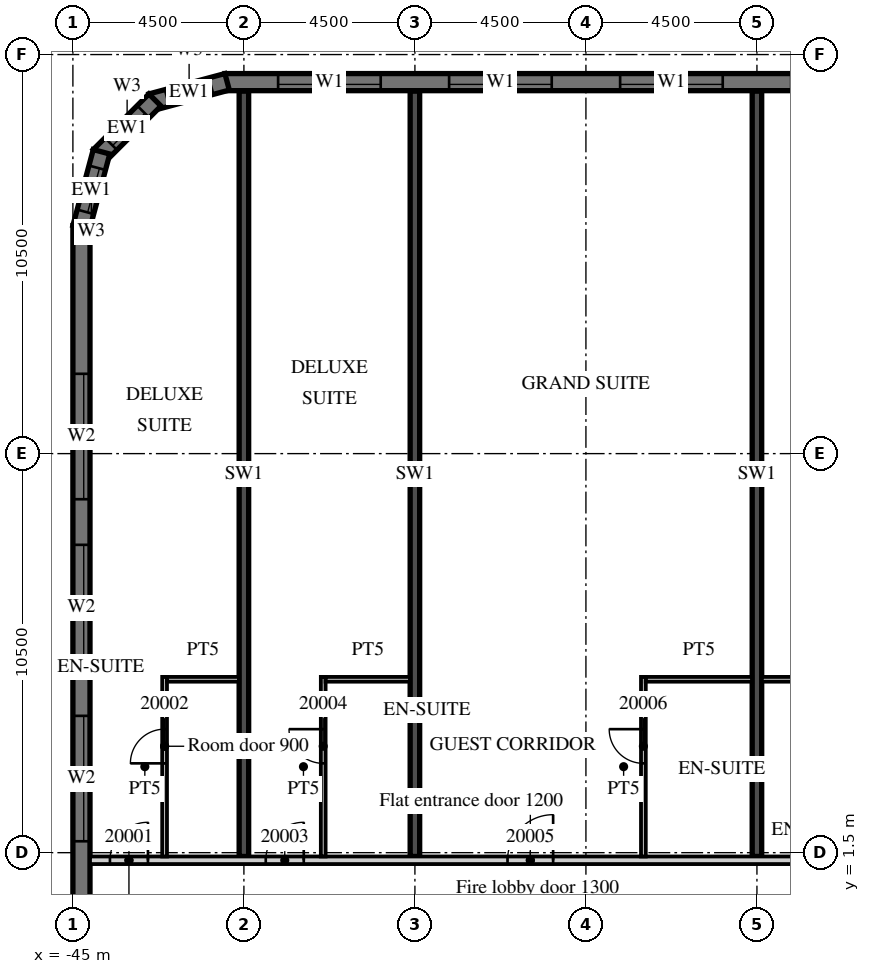
"""IFC4 building model, lengths in metres.
Left out: names, types, materials, properties, quantities, classifications, styles, units other than length and angle.
Written with IfcOpenShell. Run it as: python <this file> out.ifc"""

import sys

from ifc_helpers import new_model, si_unit, direction, frame, frame_2d, origin, place, context, subcontext, project, spatial, polyline, rectangle, outline, extrude, element, fill, save


model = new_model("IFC4")
c1 = context("Model", 3, precision=1e-05, world=origin(), true_north=direction((0.0, 1.0)))
c2 = subcontext(c1, "Body", "Model", "MODEL_VIEW")
j1 = project(units=[si_unit("LENGTHUNIT", "METRE"), si_unit("PLANEANGLEUNIT", "RADIAN")], contexts=[c1])
p1 = place(None, origin())
s1 = spatial("IfcSite", under=j1, at=p1, CompositionType="ELEMENT")
p2 = place(p1, origin())
s2 = spatial("IfcBuilding", under=s1, at=p2, CompositionType="ELEMENT")
p3 = place(p2, frame((0.0, 0.0, 96.3)))
s3 = spatial("IfcBuildingStorey", under=s2, at=p3, CompositionType="ELEMENT", Elevation=96.3)
for number, where, z_axis, x_axis in (
    (1, (-40.5, 1.4, 0.0), (0.0, 0.0, 1.0), (0.0, 1.0, 0.0)),
    (2, (-36.0, 1.4, 0.0), (0.0, 0.0, 1.0), (0.0, 1.0, 0.0)),
    (3, (-27.0, 1.4, 0.0), (0.0, 0.0, 1.0), (0.0, 1.0, 0.0)),
):
    element("IfcWall", number, at=place(p3, frame(where, z_axis=z_axis, x_axis=x_axis)), inside=s3, PredefinedType="SHEAR", context=c2, shape_type="SweptSolid", body=[
        extrude(rectangle(XDim=20.14, YDim=0.25, at=frame_2d((10.07, 0.0))), origin(), (0.0, 0.0, 1.0), 3.0),
    ])
p4 = place(p3, frame((13.5, 21.775, 0.0), z_axis=(0.0, 0.0, 1.0), x_axis=(-1.0, 0.0, 0.0)))
e4 = element("IfcWall", 4, at=p4, inside=s3, PredefinedType="SOLIDWALL", context=c2, shape_type="SweptSolid", body=[
    extrude(rectangle(XDim=54.5, YDim=0.45, at=frame_2d((27.25, 0.0))), origin(), (0.0, 0.0, 1.0), 3.0),
])
p5 = place(p4, frame((0.9, 0.0, 0.45)))
e5 = element("IfcOpeningElement", 5, at=p5, cuts=e4, PredefinedType="OPENING", context=c2, shape_type="SweptSolid", body=[
    extrude(rectangle(XDim=2.7, YDim=2.25, at=frame_2d((1.35, 1.125))), frame((0.0, 0.235, 0.0), z_axis=(0.0, -1.0, 0.0), x_axis=(1.0, 0.0, 0.0)), (0.0, 0.0, 1.0), 0.47),
])
p6 = place(p4, frame((5.4, 0.0, 0.45)))
e6 = element("IfcOpeningElement", 6, at=p6, cuts=e4, PredefinedType="OPENING", context=c2, shape_type="SweptSolid", body=[
    extrude(rectangle(XDim=2.7, YDim=2.25, at=frame_2d((1.35, 1.125))), frame((0.0, 0.235, 0.0), z_axis=(0.0, -1.0, 0.0), x_axis=(1.0, 0.0, 0.0)), (0.0, 0.0, 1.0), 0.47),
])
p7 = place(p4, frame((9.9, 0.0, 0.45)))
e7 = element("IfcOpeningElement", 7, at=p7, cuts=e4, PredefinedType="OPENING", context=c2, shape_type="SweptSolid", body=[
    extrude(rectangle(XDim=2.7, YDim=2.25, at=frame_2d((1.35, 1.125))), frame((0.0, 0.235, 0.0), z_axis=(0.0, -1.0, 0.0), x_axis=(1.0, 0.0, 0.0)), (0.0, 0.0, 1.0), 0.47),
])
p8 = place(p4, frame((14.4, 0.0, 0.45)))
e8 = element("IfcOpeningElement", 8, at=p8, cuts=e4, PredefinedType="OPENING", context=c2, shape_type="SweptSolid", body=[
    extrude(rectangle(XDim=2.7, YDim=2.25, at=frame_2d((1.35, 1.125))), frame((0.0, 0.235, 0.0), z_axis=(0.0, -1.0, 0.0), x_axis=(1.0, 0.0, 0.0)), (0.0, 0.0, 1.0), 0.47),
])
p9 = place(p4, frame((18.9, 0.0, 0.45)))
e9 = element("IfcOpeningElement", 9, at=p9, cuts=e4, PredefinedType="OPENING", context=c2, shape_type="SweptSolid", body=[
    extrude(rectangle(XDim=2.7, YDim=2.25, at=frame_2d((1.35, 1.125))), frame((0.0, 0.235, 0.0), z_axis=(0.0, -1.0, 0.0), x_axis=(1.0, 0.0, 0.0)), (0.0, 0.0, 1.0), 0.47),
])
p10 = place(p4, frame((23.4, 0.0, 0.45)))
e10 = element("IfcOpeningElement", 10, at=p10, cuts=e4, PredefinedType="OPENING", context=c2, shape_type="SweptSolid", body=[
    extrude(rectangle(XDim=2.7, YDim=2.25, at=frame_2d((1.35, 1.125))), frame((0.0, 0.235, 0.0), z_axis=(0.0, -1.0, 0.0), x_axis=(1.0, 0.0, 0.0)), (0.0, 0.0, 1.0), 0.47),
])
p11 = place(p4, frame((27.9, 0.0, 0.45)))
e11 = element("IfcOpeningElement", 11, at=p11, cuts=e4, PredefinedType="OPENING", context=c2, shape_type="SweptSolid", body=[
    extrude(rectangle(XDim=2.7, YDim=2.25, at=frame_2d((1.35, 1.125))), frame((0.0, 0.235, 0.0), z_axis=(0.0, -1.0, 0.0), x_axis=(1.0, 0.0, 0.0)), (0.0, 0.0, 1.0), 0.47),
])
p12 = place(p4, frame((32.4, 0.0, 0.45)))
e12 = element("IfcOpeningElement", 12, at=p12, cuts=e4, PredefinedType="OPENING", context=c2, shape_type="SweptSolid", body=[
    extrude(rectangle(XDim=2.7, YDim=2.25, at=frame_2d((1.35, 1.125))), frame((0.0, 0.235, 0.0), z_axis=(0.0, -1.0, 0.0), x_axis=(1.0, 0.0, 0.0)), (0.0, 0.0, 1.0), 0.47),
])
p13 = place(p4, frame((36.9, 0.0, 0.45)))
e13 = element("IfcOpeningElement", 13, at=p13, cuts=e4, PredefinedType="OPENING", context=c2, shape_type="SweptSolid", body=[
    extrude(rectangle(XDim=2.7, YDim=2.25, at=frame_2d((1.35, 1.125))), frame((0.0, 0.235, 0.0), z_axis=(0.0, -1.0, 0.0), x_axis=(1.0, 0.0, 0.0)), (0.0, 0.0, 1.0), 0.47),
])
p14 = place(p4, frame((41.4, 0.0, 0.45)))
e14 = element("IfcOpeningElement", 14, at=p14, cuts=e4, PredefinedType="OPENING", context=c2, shape_type="SweptSolid", body=[
    extrude(rectangle(XDim=2.7, YDim=2.25, at=frame_2d((1.35, 1.125))), frame((0.0, 0.235, 0.0), z_axis=(0.0, -1.0, 0.0), x_axis=(1.0, 0.0, 0.0)), (0.0, 0.0, 1.0), 0.47),
])
p15 = place(p4, frame((45.9, 0.0, 0.45)))
e15 = element("IfcOpeningElement", 15, at=p15, cuts=e4, PredefinedType="OPENING", context=c2, shape_type="SweptSolid", body=[
    extrude(rectangle(XDim=2.7, YDim=2.25, at=frame_2d((1.35, 1.125))), frame((0.0, 0.235, 0.0), z_axis=(0.0, -1.0, 0.0), x_axis=(1.0, 0.0, 0.0)), (0.0, 0.0, 1.0), 0.47),
])
p16 = place(p4, frame((50.4, 0.0, 0.45)))
e16 = element("IfcOpeningElement", 16, at=p16, cuts=e4, PredefinedType="OPENING", context=c2, shape_type="SweptSolid", body=[
    extrude(rectangle(XDim=2.7, YDim=2.25, at=frame_2d((1.35, 1.125))), frame((0.0, 0.235, 0.0), z_axis=(0.0, -1.0, 0.0), x_axis=(1.0, 0.0, 0.0)), (0.0, 0.0, 1.0), 0.47),
])
p17 = place(p3, frame((-40.942, 21.783, 0.0), z_axis=(0.0, 0.0, 1.0), x_axis=(-0.965926999034, -0.25881466832, 0.0)))
e17 = element("IfcWall", 17, at=p17, inside=s3, PredefinedType="SOLIDWALL", context=c2, shape_type="SweptSolid", body=[
    extrude(outline(polyline([(0.0, -0.225), (2.071, -0.225), (1.95, 0.225), (0.121, 0.225), (0.0, -0.225)])), origin(), (0.0, 0.0, 1.0), 3.0),
])
p18 = place(p17, frame((0.435, 0.0, 0.45)))
e18 = element("IfcOpeningElement", 18, at=p18, cuts=e17, PredefinedType="OPENING", context=c2, shape_type="SweptSolid", body=[
    extrude(rectangle(XDim=1.2, YDim=2.25, at=frame_2d((0.6, 1.125))), frame((0.0, 0.235, 0.0), z_axis=(0.0, -1.0, 0.0), x_axis=(1.0, 0.0, 0.0)), (0.0, 0.0, 1.0), 0.47),
])
p19 = place(p3, frame((-42.841, 21.305, 0.0), z_axis=(0.0, 0.0, 1.0), x_axis=(-0.707106781187, -0.707106781187, 0.0)))
e19 = element("IfcWall", 19, at=p19, inside=s3, PredefinedType="SOLIDWALL", context=c2, shape_type="SweptSolid", body=[
    extrude(outline(polyline([(0.0, -0.225), (2.071, -0.225), (1.95, 0.225), (0.121, 0.225), (0.0, -0.225)])), origin(), (0.0, 0.0, 1.0), 3.0),
])
p20 = place(p19, frame((0.435, 0.0, 0.45)))
e20 = element("IfcOpeningElement", 20, at=p20, cuts=e19, PredefinedType="OPENING", context=c2, shape_type="SweptSolid", body=[
    extrude(rectangle(XDim=1.2, YDim=2.25, at=frame_2d((0.6, 1.125))), frame((0.0, 0.235, 0.0), z_axis=(0.0, -1.0, 0.0), x_axis=(1.0, 0.0, 0.0)), (0.0, 0.0, 1.0), 0.47),
])
p21 = place(p3, frame((-44.247, 19.942, 0.0), z_axis=(0.0, 0.0, 1.0), x_axis=(-0.25881466832, -0.965926999034, 0.0)))
e21 = element("IfcWall", 21, at=p21, inside=s3, PredefinedType="SOLIDWALL", context=c2, shape_type="SweptSolid", body=[
    extrude(outline(polyline([(-0.0, -0.225), (2.07, -0.225), (1.95, 0.225), (0.12, 0.225), (-0.0, -0.225)])), origin(), (0.0, 0.0, 1.0), 3.0),
])
p22 = place(p21, frame((0.435, 0.0, 0.45)))
e22 = element("IfcOpeningElement", 22, at=p22, cuts=e21, PredefinedType="OPENING", context=c2, shape_type="SweptSolid", body=[
    extrude(rectangle(XDim=1.2, YDim=2.25, at=frame_2d((0.6, 1.125))), frame((0.0, 0.235, 0.0), z_axis=(0.0, -1.0, 0.0), x_axis=(1.0, 0.0, 0.0)), (0.0, 0.0, 1.0), 0.47),
])
p23 = place(p3, frame((-44.775, 18.0, 0.0), z_axis=(0.0, 0.0, 1.0), x_axis=(0.0, -1.0, 0.0)))
e23 = element("IfcWall", 23, at=p23, inside=s3, PredefinedType="SOLIDWALL", context=c2, shape_type="SweptSolid", body=[
    extrude(rectangle(XDim=36.0, YDim=0.45, at=frame_2d((18.0, 0.0))), origin(), (0.0, 0.0, 1.0), 3.0),
])
p24 = place(p23, frame((3.9, 0.0, 0.45)))
e24 = element("IfcOpeningElement", 24, at=p24, cuts=e23, PredefinedType="OPENING", context=c2, shape_type="SweptSolid", body=[
    extrude(rectangle(XDim=3.3, YDim=2.25, at=frame_2d((1.65, 1.125))), frame((0.0, 0.235, 0.0), z_axis=(0.0, -1.0, 0.0), x_axis=(1.0, 0.0, 0.0)), (0.0, 0.0, 1.0), 0.47),
])
p25 = place(p23, frame((8.4, 0.0, 0.45)))
e25 = element("IfcOpeningElement", 25, at=p25, cuts=e23, PredefinedType="OPENING", context=c2, shape_type="SweptSolid", body=[
    extrude(rectangle(XDim=3.3, YDim=2.25, at=frame_2d((1.65, 1.125))), frame((0.0, 0.235, 0.0), z_axis=(0.0, -1.0, 0.0), x_axis=(1.0, 0.0, 0.0)), (0.0, 0.0, 1.0), 0.47),
])
p26 = place(p23, frame((12.9, 0.0, 0.45)))
e26 = element("IfcOpeningElement", 26, at=p26, cuts=e23, PredefinedType="OPENING", context=c2, shape_type="SweptSolid", body=[
    extrude(rectangle(XDim=3.3, YDim=2.25, at=frame_2d((1.65, 1.125))), frame((0.0, 0.235, 0.0), z_axis=(0.0, -1.0, 0.0), x_axis=(1.0, 0.0, 0.0)), (0.0, 0.0, 1.0), 0.47),
])
p27 = place(p3, frame((-44.55, 1.3, 0.0), z_axis=(0.0, 0.0, 1.0), x_axis=(1.0, 0.0, 0.0)))
e27 = element("IfcWall", 27, at=p27, inside=s3, PredefinedType="PARTITIONING", context=c2, shape_type="SweptSolid", body=[
    extrude(rectangle(XDim=58.05, YDim=0.2, at=frame_2d((29.025, 0.0))), origin(), (0.0, 0.0, 1.0), 3.0),
])
p28 = place(p27, frame((0.525, 0.0, 0.0)))
e28 = element("IfcOpeningElement", 28, at=p28, cuts=e27, PredefinedType="OPENING", context=c2, shape_type="SweptSolid", body=[
    extrude(rectangle(XDim=1.0, YDim=2.1, at=frame_2d((0.5, 1.05))), frame((0.0, 0.11, 0.0), z_axis=(0.0, -1.0, 0.0), x_axis=(1.0, 0.0, 0.0)), (0.0, 0.0, 1.0), 0.22),
])
p29 = place(p27, frame((4.625, 0.0, 0.0)))
e29 = element("IfcOpeningElement", 29, at=p29, cuts=e27, PredefinedType="OPENING", context=c2, shape_type="SweptSolid", body=[
    extrude(rectangle(XDim=1.0, YDim=2.1, at=frame_2d((0.5, 1.05))), frame((0.0, 0.11, 0.0), z_axis=(0.0, -1.0, 0.0), x_axis=(1.0, 0.0, 0.0)), (0.0, 0.0, 1.0), 0.22),
])
p30 = place(p27, frame((10.987, 0.0, 0.0)))
e30 = element("IfcOpeningElement", 30, at=p30, cuts=e27, PredefinedType="OPENING", context=c2, shape_type="SweptSolid", body=[
    extrude(rectangle(XDim=1.2, YDim=2.1, at=frame_2d((0.6, 1.05))), frame((0.0, 0.11, 0.0), z_axis=(0.0, -1.0, 0.0), x_axis=(1.0, 0.0, 0.0)), (0.0, 0.0, 1.0), 0.22),
])
p31 = place(p27, frame((22.912, 0.0, 0.0)))
e31 = element("IfcOpeningElement", 31, at=p31, cuts=e27, PredefinedType="OPENING", context=c2, shape_type="SweptSolid", body=[
    extrude(rectangle(XDim=1.2, YDim=2.1, at=frame_2d((0.6, 1.05))), frame((0.0, 0.11, 0.0), z_axis=(0.0, -1.0, 0.0), x_axis=(1.0, 0.0, 0.0)), (0.0, 0.0, 1.0), 0.22),
])
p32 = place(p27, frame((28.987, 0.0, 0.0)))
e32 = element("IfcOpeningElement", 32, at=p32, cuts=e27, PredefinedType="OPENING", context=c2, shape_type="SweptSolid", body=[
    extrude(rectangle(XDim=1.2, YDim=2.1, at=frame_2d((0.6, 1.05))), frame((0.0, 0.11, 0.0), z_axis=(0.0, -1.0, 0.0), x_axis=(1.0, 0.0, 0.0)), (0.0, 0.0, 1.0), 0.22),
])
p33 = place(p27, frame((36.125, 0.0, 0.0)))
e33 = element("IfcOpeningElement", 33, at=p33, cuts=e27, PredefinedType="OPENING", context=c2, shape_type="SweptSolid", body=[
    extrude(rectangle(XDim=1.0, YDim=2.1, at=frame_2d((0.5, 1.05))), frame((0.0, 0.11, 0.0), z_axis=(0.0, -1.0, 0.0), x_axis=(1.0, 0.0, 0.0)), (0.0, 0.0, 1.0), 0.22),
])
p34 = place(p27, frame((42.975, 0.0, 0.0)))
e34 = element("IfcOpeningElement", 34, at=p34, cuts=e27, PredefinedType="OPENING", context=c2, shape_type="SweptSolid", body=[
    extrude(rectangle(XDim=1.0, YDim=2.1, at=frame_2d((0.5, 1.05))), frame((0.0, 0.11, 0.0), z_axis=(0.0, -1.0, 0.0), x_axis=(1.0, 0.0, 0.0)), (0.0, 0.0, 1.0), 0.22),
])
p35 = place(p27, frame((47.5, 0.0, 0.0)))
e35 = element("IfcOpeningElement", 35, at=p35, cuts=e27, PredefinedType="OPENING", context=c2, shape_type="SweptSolid", body=[
    extrude(rectangle(XDim=1.0, YDim=2.1, at=frame_2d((0.5, 1.05))), frame((0.0, 0.11, 0.0), z_axis=(0.0, -1.0, 0.0), x_axis=(1.0, 0.0, 0.0)), (0.0, 0.0, 1.0), 0.22),
])
p36 = place(p27, frame((49.6, 0.0, 0.0)))
e36 = element("IfcOpeningElement", 36, at=p36, cuts=e27, PredefinedType="OPENING", context=c2, shape_type="SweptSolid", body=[
    extrude(rectangle(XDim=1.0, YDim=2.1, at=frame_2d((0.5, 1.05))), frame((0.0, 0.11, 0.0), z_axis=(0.0, -1.0, 0.0), x_axis=(1.0, 0.0, 0.0)), (0.0, 0.0, 1.0), 0.22),
])
p37 = place(p27, frame((56.475, 0.0, 0.0)))
e37 = element("IfcOpeningElement", 37, at=p37, cuts=e27, PredefinedType="OPENING", context=c2, shape_type="SweptSolid", body=[
    extrude(rectangle(XDim=1.0, YDim=2.1, at=frame_2d((0.5, 1.05))), frame((0.0, 0.11, 0.0), z_axis=(0.0, -1.0, 0.0), x_axis=(1.0, 0.0, 0.0)), (0.0, 0.0, 1.0), 0.22),
])
p38 = place(p3, frame((-42.587, 1.4, 0.0), z_axis=(0.0, 0.0, 1.0), x_axis=(0.0, 1.0, 0.0)))
e38 = element("IfcWall", 38, at=p38, inside=s3, PredefinedType="PARTITIONING", context=c2, shape_type="SweptSolid", body=[
    extrude(rectangle(XDim=4.725, YDim=0.125, at=frame_2d((2.363, 0.0))), origin(), (0.0, 0.0, 1.0), 3.0),
])
p39 = place(p38, frame((2.45, 0.0, 0.0)))
e39 = element("IfcOpeningElement", 39, at=p39, cuts=e38, PredefinedType="OPENING", context=c2, shape_type="SweptSolid", body=[
    extrude(rectangle(XDim=0.9, YDim=2.1, at=frame_2d((0.45, 1.05))), frame((0.0, 0.073, 0.0), z_axis=(0.0, -1.0, 0.0), x_axis=(1.0, 0.0, 0.0)), (0.0, 0.0, 1.0), 0.145),
])
p40 = place(p3, frame((-42.525, 6.062, 0.0), z_axis=(0.0, 0.0, 1.0), x_axis=(1.0, 0.0, 0.0)))
e40 = element("IfcWall", 40, at=p40, inside=s3, PredefinedType="PARTITIONING", context=c2, shape_type="SweptSolid", body=[
    extrude(rectangle(XDim=1.9, YDim=0.125, at=frame_2d((0.95, 0.0))), origin(), (0.0, 0.0, 1.0), 3.0),
])
p41 = place(p3, frame((-38.413, 1.4, 0.0), z_axis=(0.0, 0.0, 1.0), x_axis=(0.0, 1.0, 0.0)))
e41 = element("IfcWall", 41, at=p41, inside=s3, PredefinedType="PARTITIONING", context=c2, shape_type="SweptSolid", body=[
    extrude(rectangle(XDim=4.725, YDim=0.125, at=frame_2d((2.363, 0.0))), origin(), (0.0, 0.0, 1.0), 3.0),
])
p42 = place(p41, frame((2.45, 0.0, 0.0)))
e42 = element("IfcOpeningElement", 42, at=p42, cuts=e41, PredefinedType="OPENING", context=c2, shape_type="SweptSolid", body=[
    extrude(rectangle(XDim=0.9, YDim=2.1, at=frame_2d((0.45, 1.05))), frame((0.0, 0.073, 0.0), z_axis=(0.0, -1.0, 0.0), x_axis=(1.0, 0.0, 0.0)), (0.0, 0.0, 1.0), 0.145),
])
p43 = place(p3, frame((-38.35, 6.062, 0.0), z_axis=(0.0, 0.0, 1.0), x_axis=(1.0, 0.0, 0.0)))
e43 = element("IfcWall", 43, at=p43, inside=s3, PredefinedType="PARTITIONING", context=c2, shape_type="SweptSolid", body=[
    extrude(rectangle(XDim=2.225, YDim=0.125, at=frame_2d((1.113, 0.0))), origin(), (0.0, 0.0, 1.0), 3.0),
])
p44 = place(p3, frame((-29.988, 1.4, 0.0), z_axis=(0.0, 0.0, 1.0), x_axis=(0.0, 1.0, 0.0)))
e44 = element("IfcWall", 44, at=p44, inside=s3, PredefinedType="PARTITIONING", context=c2, shape_type="SweptSolid", body=[
    extrude(rectangle(XDim=4.725, YDim=0.125, at=frame_2d((2.363, 0.0))), origin(), (0.0, 0.0, 1.0), 3.0),
])
p45 = place(p44, frame((2.45, 0.0, 0.0)))
e45 = element("IfcOpeningElement", 45, at=p45, cuts=e44, PredefinedType="OPENING", context=c2, shape_type="SweptSolid", body=[
    extrude(rectangle(XDim=0.9, YDim=2.1, at=frame_2d((0.45, 1.05))), frame((0.0, 0.073, 0.0), z_axis=(0.0, -1.0, 0.0), x_axis=(1.0, 0.0, 0.0)), (0.0, 0.0, 1.0), 0.145),
])
for number, where, z_axis, x_axis in (
    (46, (-29.925, 6.062, 0.0), (0.0, 0.0, 1.0), (1.0, 0.0, 0.0)),
    (47, (-26.875, 6.062, 0.0), (0.0, 0.0, 1.0), (1.0, 0.0, 0.0)),
):
    element("IfcWall", number, at=place(p3, frame(where, z_axis=z_axis, x_axis=x_axis)), inside=s3, PredefinedType="PARTITIONING", context=c2, shape_type="SweptSolid", body=[
        extrude(rectangle(XDim=2.8, YDim=0.125, at=frame_2d((1.4, 0.0))), origin(), (0.0, 0.0, 1.0), 3.0),
    ])
p46 = place(p14, origin())
e48 = element("IfcWindow", 48, at=p46, inside=s3, PartitioningType="SINGLE_PANEL", PredefinedType="WINDOW", context=c2, shape_type="SweptSolid", body=[
    extrude(rectangle(XDim=2.7, YDim=2.25, at=frame_2d((1.35, 1.125))), frame((0.0, 0.09, 0.0), z_axis=(0.0, -1.0, 0.0), x_axis=(1.0, 0.0, 0.0)), (0.0, 0.0, 1.0), 0.06),
])
fill(e14, e48)
p47 = place(p15, origin())
e49 = element("IfcWindow", 49, at=p47, inside=s3, PartitioningType="SINGLE_PANEL", PredefinedType="WINDOW", context=c2, shape_type="SweptSolid", body=[
    extrude(rectangle(XDim=2.7, YDim=2.25, at=frame_2d((1.35, 1.125))), frame((0.0, 0.09, 0.0), z_axis=(0.0, -1.0, 0.0), x_axis=(1.0, 0.0, 0.0)), (0.0, 0.0, 1.0), 0.06),
])
fill(e15, e49)
p48 = place(p16, origin())
e50 = element("IfcWindow", 50, at=p48, inside=s3, PartitioningType="SINGLE_PANEL", PredefinedType="WINDOW", context=c2, shape_type="SweptSolid", body=[
    extrude(rectangle(XDim=2.7, YDim=2.25, at=frame_2d((1.35, 1.125))), frame((0.0, 0.09, 0.0), z_axis=(0.0, -1.0, 0.0), x_axis=(1.0, 0.0, 0.0)), (0.0, 0.0, 1.0), 0.06),
])
fill(e16, e50)
p49 = place(p18, origin())
e51 = element("IfcWindow", 51, at=p49, inside=s3, PartitioningType="SINGLE_PANEL", PredefinedType="WINDOW", context=c2, shape_type="SweptSolid", body=[
    extrude(rectangle(XDim=1.2, YDim=2.25, at=frame_2d((0.6, 1.125))), frame((0.0, 0.09, 0.0), z_axis=(0.0, -1.0, 0.0), x_axis=(1.0, 0.0, 0.0)), (0.0, 0.0, 1.0), 0.06),
])
fill(e18, e51)
p50 = place(p20, origin())
e52 = element("IfcWindow", 52, at=p50, inside=s3, PartitioningType="SINGLE_PANEL", PredefinedType="WINDOW", context=c2, shape_type="SweptSolid", body=[
    extrude(rectangle(XDim=1.2, YDim=2.25, at=frame_2d((0.6, 1.125))), frame((0.0, 0.09, 0.0), z_axis=(0.0, -1.0, 0.0), x_axis=(1.0, 0.0, 0.0)), (0.0, 0.0, 1.0), 0.06),
])
fill(e20, e52)
p51 = place(p22, origin())
e53 = element("IfcWindow", 53, at=p51, inside=s3, PartitioningType="SINGLE_PANEL", PredefinedType="WINDOW", context=c2, shape_type="SweptSolid", body=[
    extrude(rectangle(XDim=1.2, YDim=2.25, at=frame_2d((0.6, 1.125))), frame((0.0, 0.09, 0.0), z_axis=(0.0, -1.0, 0.0), x_axis=(1.0, 0.0, 0.0)), (0.0, 0.0, 1.0), 0.06),
])
fill(e22, e53)
p52 = place(p24, origin())
e54 = element("IfcWindow", 54, at=p52, inside=s3, PartitioningType="SINGLE_PANEL", PredefinedType="WINDOW", context=c2, shape_type="SweptSolid", body=[
    extrude(rectangle(XDim=3.3, YDim=2.25, at=frame_2d((1.65, 1.125))), frame((0.0, 0.09, 0.0), z_axis=(0.0, -1.0, 0.0), x_axis=(1.0, 0.0, 0.0)), (0.0, 0.0, 1.0), 0.06),
])
fill(e24, e54)
p53 = place(p25, origin())
e55 = element("IfcWindow", 55, at=p53, inside=s3, PartitioningType="SINGLE_PANEL", PredefinedType="WINDOW", context=c2, shape_type="SweptSolid", body=[
    extrude(rectangle(XDim=3.3, YDim=2.25, at=frame_2d((1.65, 1.125))), frame((0.0, 0.09, 0.0), z_axis=(0.0, -1.0, 0.0), x_axis=(1.0, 0.0, 0.0)), (0.0, 0.0, 1.0), 0.06),
])
fill(e25, e55)
p54 = place(p26, origin())
e56 = element("IfcWindow", 56, at=p54, inside=s3, PartitioningType="SINGLE_PANEL", PredefinedType="WINDOW", context=c2, shape_type="SweptSolid", body=[
    extrude(rectangle(XDim=3.3, YDim=2.25, at=frame_2d((1.65, 1.125))), frame((0.0, 0.09, 0.0), z_axis=(0.0, -1.0, 0.0), x_axis=(1.0, 0.0, 0.0)), (0.0, 0.0, 1.0), 0.06),
])
fill(e26, e56)
p55 = place(p28, origin())
e57 = element("IfcDoor", 57, at=p55, inside=s3, OperationType="SINGLE_SWING_RIGHT", PredefinedType="DOOR", context=c2, shape_type="SweptSolid", body=[
    extrude(rectangle(XDim=1.0, YDim=2.1, at=frame_2d((0.5, 1.05))), frame((0.0, 0.025, 0.0), z_axis=(0.0, -1.0, 0.0), x_axis=(1.0, 0.0, 0.0)), (0.0, 0.0, 1.0), 0.05),
])
fill(e28, e57)
p56 = place(p39, origin())
e58 = element("IfcDoor", 58, at=p56, inside=s3, OperationType="SINGLE_SWING_LEFT", PredefinedType="DOOR", context=c2, shape_type="SweptSolid", body=[
    extrude(rectangle(XDim=0.9, YDim=2.1, at=frame_2d((0.45, 1.05))), frame((0.0, 0.025, 0.0), z_axis=(0.0, -1.0, 0.0), x_axis=(1.0, 0.0, 0.0)), (0.0, 0.0, 1.0), 0.05),
])
fill(e39, e58)
p57 = place(p29, origin())
e59 = element("IfcDoor", 59, at=p57, inside=s3, OperationType="SINGLE_SWING_RIGHT", PredefinedType="DOOR", context=c2, shape_type="SweptSolid", body=[
    extrude(rectangle(XDim=1.0, YDim=2.1, at=frame_2d((0.5, 1.05))), frame((0.0, 0.025, 0.0), z_axis=(0.0, -1.0, 0.0), x_axis=(1.0, 0.0, 0.0)), (0.0, 0.0, 1.0), 0.05),
])
fill(e29, e59)
p58 = place(p42, origin())
e60 = element("IfcDoor", 60, at=p58, inside=s3, OperationType="SINGLE_SWING_RIGHT", PredefinedType="DOOR", context=c2, shape_type="SweptSolid", body=[
    extrude(rectangle(XDim=0.9, YDim=2.1, at=frame_2d((0.45, 1.05))), frame((0.0, 0.025, 0.0), z_axis=(0.0, -1.0, 0.0), x_axis=(1.0, 0.0, 0.0)), (0.0, 0.0, 1.0), 0.05),
])
fill(e42, e60)
p59 = place(p30, origin())
e61 = element("IfcDoor", 61, at=p59, inside=s3, OperationType="SINGLE_SWING_RIGHT", PredefinedType="DOOR", context=c2, shape_type="SweptSolid", body=[
    extrude(rectangle(XDim=1.2, YDim=2.1, at=frame_2d((0.6, 1.05))), frame((0.0, 0.025, 0.0), z_axis=(0.0, -1.0, 0.0), x_axis=(1.0, 0.0, 0.0)), (0.0, 0.0, 1.0), 0.05),
])
fill(e30, e61)
p60 = place(p45, origin())
e62 = element("IfcDoor", 62, at=p60, inside=s3, OperationType="SINGLE_SWING_RIGHT", PredefinedType="DOOR", context=c2, shape_type="SweptSolid", body=[
    extrude(rectangle(XDim=0.9, YDim=2.1, at=frame_2d((0.45, 1.05))), frame((0.0, 0.025, 0.0), z_axis=(0.0, -1.0, 0.0), x_axis=(1.0, 0.0, 0.0)), (0.0, 0.0, 1.0), 0.05),
])
fill(e45, e62)
save(model, sys.argv[1])
